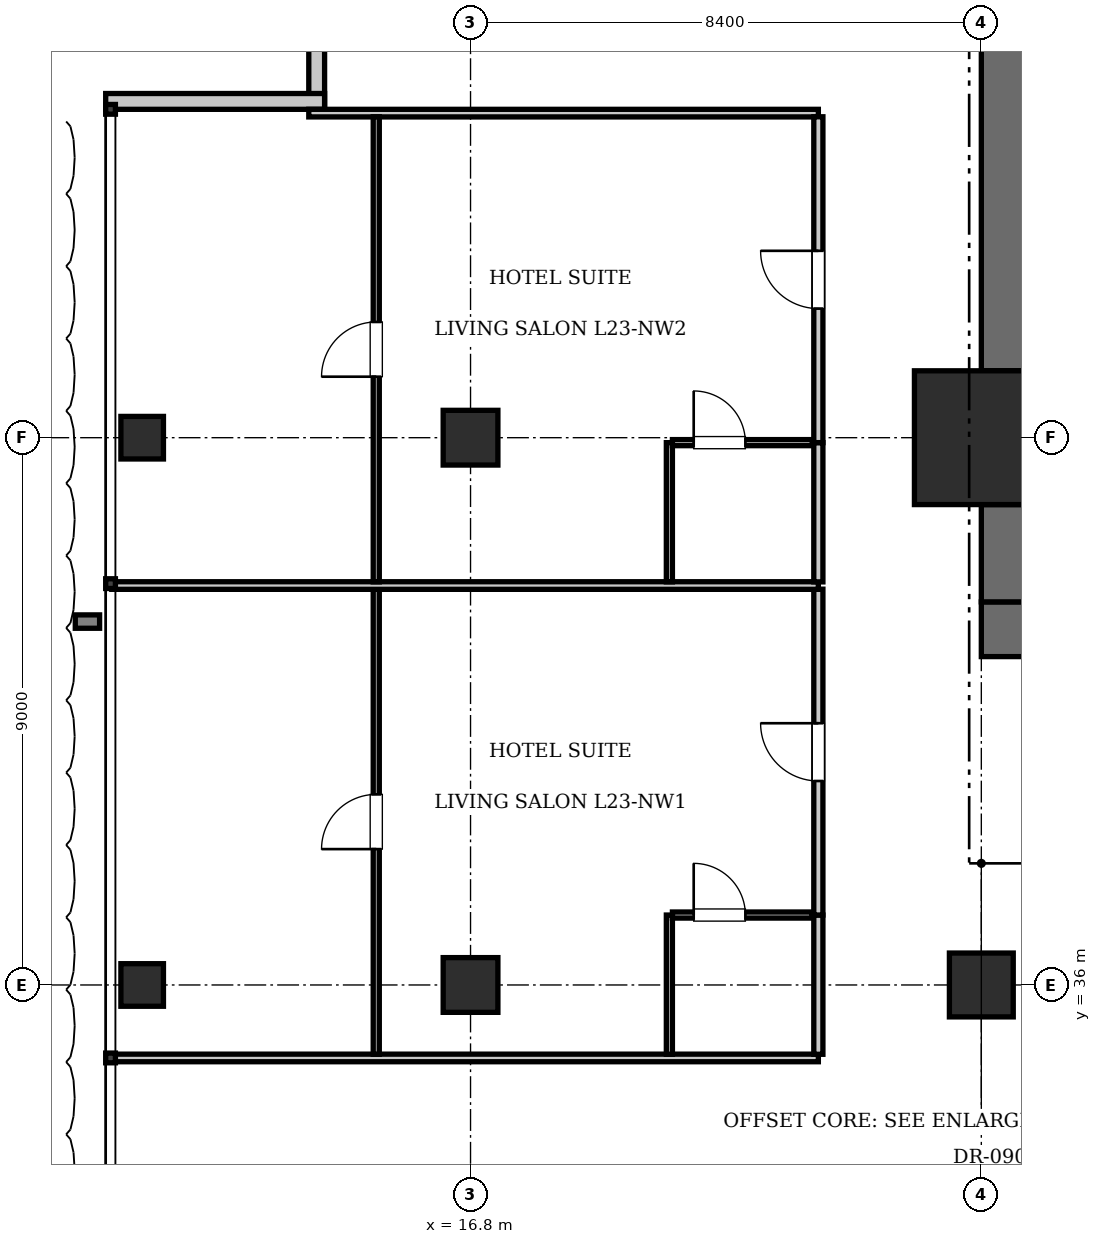
"""IFC4 building model, lengths in metres.
Left out: names, types, materials, properties, quantities, classifications, styles, units other than length and angle.
Written with IfcOpenShell. Run it as: python <this file> out.ifc"""

import sys

from ifc_helpers import new_model, si_unit, direction, frame, frame_2d, origin, origin_2d, place, context, subcontext, project, spatial, rectangle, i_section, extrude, element, fill, save


model = new_model("IFC4")
c1 = context("Model", 3, precision=1e-05, world=origin(), true_north=direction((0.0, 1.0)))
c2 = subcontext(c1, "Body", "Model", "MODEL_VIEW")
j1 = project(units=[si_unit("LENGTHUNIT", "METRE"), si_unit("PLANEANGLEUNIT", "RADIAN")], contexts=[c1])
p1 = place(None, origin())
s1 = spatial("IfcSite", under=j1, at=p1, CompositionType="ELEMENT")
p2 = place(p1, origin())
s2 = spatial("IfcBuilding", under=s1, at=p2, CompositionType="ELEMENT")
p3 = place(p2, frame((0.0, 0.0, 96.25)))
s3 = spatial("IfcBuildingStorey", under=s2, at=p3, CompositionType="ELEMENT", Elevation=96.25)
p4 = place(p3, frame((25.2, 45.0, 0.0), z_axis=(0.0, 0.0, 1.0), x_axis=(1.0, 0.0, 0.0)))
e1 = element("IfcColumn", 1, at=p4, inside=s3, PredefinedType="COLUMN", context=c2, shape_type="SweptSolid", body=[
    extrude(rectangle(XDim=2.2, YDim=2.2, at=origin_2d()), origin(), (0.0, 0.0, 1.0), 3.85),
])
p5 = place(p3, frame((25.2, 41.85, 0.0), z_axis=(0.0, 0.0, 1.0), x_axis=(1.0, 0.0, 0.0)))
e2 = element("IfcWall", 2, at=p5, inside=s3, PredefinedType="SHEAR", context=c2, shape_type="SweptSolid", body=[
    extrude(rectangle(XDim=6.8, YDim=0.9, at=frame_2d((3.4, 0.0))), origin(), (0.0, 0.0, 1.0), 3.85),
])
p6 = place(p5, frame((1.65, 0.0, 0.0)))
e3 = element("IfcOpeningElement", 3, at=p6, cuts=e2, PredefinedType="OPENING", context=c2, shape_type="SweptSolid", body=[
    extrude(rectangle(XDim=1.15, YDim=2.15, at=frame_2d((0.575, 1.075))), frame((0.0, 0.46, 0.0), z_axis=(0.0, -1.0, 0.0), x_axis=(1.0, 0.0, 0.0)), (0.0, 0.0, 1.0), 0.92),
])
p7 = place(p5, frame((5.15, 0.0, 0.0)))
e4 = element("IfcOpeningElement", 4, at=p7, cuts=e2, PredefinedType="OPENING", context=c2, shape_type="SweptSolid", body=[
    extrude(rectangle(XDim=1.1, YDim=2.2, at=frame_2d((0.55, 1.1))), frame((0.0, 0.46, 0.0), z_axis=(0.0, -1.0, 0.0), x_axis=(1.0, 0.0, 0.0)), (0.0, 0.0, 1.0), 0.92),
])
p8 = place(p3, frame((25.65, 42.3, 0.0), z_axis=(0.0, 0.0, 1.0), x_axis=(0.0, 1.0, 0.0)))
e5 = element("IfcWall", 5, at=p8, inside=s3, PredefinedType="SHEAR", context=c2, shape_type="SweptSolid", body=[
    extrude(rectangle(XDim=1.6, YDim=0.9, at=frame_2d((0.8, 0.0))), origin(), (0.0, 0.0, 1.0), 3.85),
])
p9 = place(p3, frame((25.65, 46.1, 0.0), z_axis=(0.0, 0.0, 1.0), x_axis=(0.0, 1.0, 0.0)))
e6 = element("IfcWall", 6, at=p9, inside=s3, PredefinedType="SHEAR", context=c2, shape_type="SweptSolid", body=[
    extrude(rectangle(XDim=7.0, YDim=0.9, at=frame_2d((3.5, 0.0))), origin(), (0.0, 0.0, 1.0), 3.85),
])
p10 = place(p3, frame((25.2, 36.0, 0.0), z_axis=(0.0, 0.0, 1.0), x_axis=(1.0, 0.0, 0.0)))
e7 = element("IfcColumn", 7, at=p10, inside=s3, PredefinedType="COLUMN", context=c2, shape_type="SweptSolid", body=[
    extrude(rectangle(XDim=1.05, YDim=1.05, at=origin_2d()), origin(), (0.0, 0.0, 1.0), 3.85),
])
for number, where, z_axis, x_axis in (
    (8, (16.8, 36.0, 0.0), (0.0, 0.0, 1.0), (1.0, 0.0, 0.0)),
    (9, (16.8, 45.0, 0.0), (0.0, 0.0, 1.0), (1.0, 0.0, 0.0)),
):
    element("IfcColumn", number, at=place(p3, frame(where, z_axis=z_axis, x_axis=x_axis)), inside=s3, PredefinedType="COLUMN", context=c2, shape_type="SweptSolid", body=[
        extrude(rectangle(XDim=0.9, YDim=0.9, at=origin_2d()), origin(), (0.0, 0.0, 1.0), 3.85),
    ])
for number, where, z_axis, x_axis in (
    (10, (11.4, 36.0, 0.0), (0.0, 0.0, 1.0), (1.0, 0.0, 0.0)),
    (11, (11.4, 45.0, 0.0), (0.0, 0.0, 1.0), (1.0, 0.0, 0.0)),
):
    element("IfcColumn", number, at=place(p3, frame(where, z_axis=z_axis, x_axis=x_axis)), inside=s3, PredefinedType="COLUMN", context=c2, shape_type="SweptSolid", body=[
        extrude(i_section(OverallWidth=0.7, OverallDepth=0.7, WebThickness=0.028, FlangeThickness=0.044, at=origin_2d()), origin(), (0.0, 0.0, 1.0), 3.85),
    ])
p11 = place(p3, frame((14.27, 50.4, 0.0), z_axis=(0.0, 0.0, 1.0), x_axis=(0.0, 1.0, 0.0)))
e12 = element("IfcWall", 12, at=p11, inside=s3, PredefinedType="SOLIDWALL", context=c2, shape_type="SweptSolid", body=[
    extrude(rectangle(XDim=3.6, YDim=0.26, at=frame_2d((1.8, 0.0))), origin(), (0.0, 0.0, 1.0), 3.61),
])
p12 = place(p3, frame((10.8, 50.53, 0.0), z_axis=(0.0, 0.0, 1.0), x_axis=(1.0, 0.0, 0.0)))
e13 = element("IfcWall", 13, at=p12, inside=s3, PredefinedType="SOLIDWALL", context=c2, shape_type="SweptSolid", body=[
    extrude(rectangle(XDim=3.6, YDim=0.26, at=frame_2d((1.8, 0.0))), origin(), (0.0, 0.0, 1.0), 3.61),
])
p13 = place(p3, frame((10.9, 34.8, 0.0), z_axis=(0.0, 0.0, 1.0), x_axis=(1.0, 0.0, 0.0)))
e14 = element("IfcWall", 14, at=p13, inside=s3, PredefinedType="PARTITIONING", context=c2, shape_type="SweptSolid", body=[
    extrude(rectangle(XDim=11.62, YDim=0.125, at=frame_2d((5.81, 0.0))), origin(), (0.0, 0.0, 1.0), 3.61),
])
p14 = place(p3, frame((14.14, 50.337, 0.0), z_axis=(0.0, 0.0, 1.0), x_axis=(1.0, 0.0, 0.0)))
e15 = element("IfcWall", 15, at=p14, inside=s3, PredefinedType="PARTITIONING", context=c2, shape_type="SweptSolid", body=[
    extrude(rectangle(XDim=8.38, YDim=0.125, at=frame_2d((4.19, 0.0))), origin(), (0.0, 0.0, 1.0), 3.61),
])
p15 = place(p3, frame((22.52, 34.86, 0.0), z_axis=(0.0, 0.0, 1.0), x_axis=(0.0, 1.0, 0.0)))
e16 = element("IfcWall", 16, at=p15, inside=s3, PredefinedType="PARTITIONING", context=c2, shape_type="SweptSolid", body=[
    extrude(rectangle(XDim=2.29, YDim=0.15, at=frame_2d((1.145, 0.0))), origin(), (0.0, 0.0, 1.0), 3.61),
])
p16 = place(p3, frame((22.52, 37.15, 0.0), z_axis=(0.0, 0.0, 1.0), x_axis=(0.0, 1.0, 0.0)))
e17 = element("IfcWall", 17, at=p16, inside=s3, PredefinedType="PARTITIONING", context=c2, shape_type="SweptSolid", body=[
    extrude(rectangle(XDim=5.359, YDim=0.15, at=frame_2d((2.679, 0.0))), origin(), (0.0, 0.0, 1.0), 3.61),
])
p17 = place(p16, frame((2.204, 0.0, 0.0)))
e18 = element("IfcOpeningElement", 18, at=p17, cuts=e17, PredefinedType="OPENING", context=c2, shape_type="SweptSolid", body=[
    extrude(rectangle(XDim=0.95, YDim=2.15, at=frame_2d((0.475, 1.075))), frame((0.0, 0.085, 0.0), z_axis=(0.0, -1.0, 0.0), x_axis=(1.0, 0.0, 0.0)), (0.0, 0.0, 1.0), 0.17),
])
p18 = place(p3, frame((20.07, 34.86, 0.0), z_axis=(0.0, 0.0, 1.0), x_axis=(0.0, 1.0, 0.0)))
e19 = element("IfcWall", 19, at=p18, inside=s3, PredefinedType="PARTITIONING", context=c2, shape_type="SweptSolid", body=[
    extrude(rectangle(XDim=2.29, YDim=0.1, at=frame_2d((1.145, 0.0))), origin(), (0.0, 0.0, 1.0), 3.61),
])
p19 = place(p3, frame((20.12, 37.15, 0.0), z_axis=(0.0, 0.0, 1.0), x_axis=(1.0, 0.0, 0.0)))
e20 = element("IfcWall", 20, at=p19, inside=s3, PredefinedType="PARTITIONING", context=c2, shape_type="SweptSolid", body=[
    extrude(rectangle(XDim=2.3, YDim=0.1, at=frame_2d((1.15, 0.0))), origin(), (0.0, 0.0, 1.0), 3.61),
])
p20 = place(p19, frame((0.35, 0.0, 0.0)))
e21 = element("IfcOpeningElement", 21, at=p20, cuts=e20, PredefinedType="OPENING", context=c2, shape_type="SweptSolid", body=[
    extrude(rectangle(XDim=0.85, YDim=2.1, at=frame_2d((0.425, 1.05))), frame((0.0, 0.06, 0.0), z_axis=(0.0, -1.0, 0.0), x_axis=(1.0, 0.0, 0.0)), (0.0, 0.0, 1.0), 0.12),
])
p21 = place(p3, frame((15.25, 34.86, 0.0), z_axis=(0.0, 0.0, 1.0), x_axis=(0.0, 1.0, 0.0)))
e22 = element("IfcWall", 22, at=p21, inside=s3, PredefinedType="PARTITIONING", context=c2, shape_type="SweptSolid", body=[
    extrude(rectangle(XDim=7.649, YDim=0.1, at=frame_2d((3.824, 0.0))), origin(), (0.0, 0.0, 1.0), 3.61),
])
p22 = place(p21, frame((3.374, 0.0, 0.0)))
e23 = element("IfcOpeningElement", 23, at=p22, cuts=e22, PredefinedType="OPENING", context=c2, shape_type="SweptSolid", body=[
    extrude(rectangle(XDim=0.9, YDim=2.1, at=frame_2d((0.45, 1.05))), frame((0.0, 0.06, 0.0), z_axis=(0.0, -1.0, 0.0), x_axis=(1.0, 0.0, 0.0)), (0.0, 0.0, 1.0), 0.12),
])
p23 = place(p3, frame((10.9, 42.569, 0.0), z_axis=(0.0, 0.0, 1.0), x_axis=(1.0, 0.0, 0.0)))
e24 = element("IfcWall", 24, at=p23, inside=s3, PredefinedType="PARTITIONING", context=c2, shape_type="SweptSolid", body=[
    extrude(rectangle(XDim=11.62, YDim=0.125, at=frame_2d((5.81, 0.0))), origin(), (0.0, 0.0, 1.0), 3.61),
])
p24 = place(p3, frame((22.52, 42.629, 0.0), z_axis=(0.0, 0.0, 1.0), x_axis=(0.0, 1.0, 0.0)))
e25 = element("IfcWall", 25, at=p24, inside=s3, PredefinedType="PARTITIONING", context=c2, shape_type="SweptSolid", body=[
    extrude(rectangle(XDim=2.29, YDim=0.15, at=frame_2d((1.145, 0.0))), origin(), (0.0, 0.0, 1.0), 3.61),
])
p25 = place(p3, frame((22.52, 44.919, 0.0), z_axis=(0.0, 0.0, 1.0), x_axis=(0.0, 1.0, 0.0)))
e26 = element("IfcWall", 26, at=p25, inside=s3, PredefinedType="PARTITIONING", context=c2, shape_type="SweptSolid", body=[
    extrude(rectangle(XDim=5.359, YDim=0.15, at=frame_2d((2.679, 0.0))), origin(), (0.0, 0.0, 1.0), 3.61),
])
p26 = place(p25, frame((2.204, 0.0, 0.0)))
e27 = element("IfcOpeningElement", 27, at=p26, cuts=e26, PredefinedType="OPENING", context=c2, shape_type="SweptSolid", body=[
    extrude(rectangle(XDim=0.95, YDim=2.15, at=frame_2d((0.475, 1.075))), frame((0.0, 0.085, 0.0), z_axis=(0.0, -1.0, 0.0), x_axis=(1.0, 0.0, 0.0)), (0.0, 0.0, 1.0), 0.17),
])
p27 = place(p3, frame((20.07, 42.629, 0.0), z_axis=(0.0, 0.0, 1.0), x_axis=(0.0, 1.0, 0.0)))
e28 = element("IfcWall", 28, at=p27, inside=s3, PredefinedType="PARTITIONING", context=c2, shape_type="SweptSolid", body=[
    extrude(rectangle(XDim=2.29, YDim=0.1, at=frame_2d((1.145, 0.0))), origin(), (0.0, 0.0, 1.0), 3.61),
])
p28 = place(p3, frame((20.12, 44.919, 0.0), z_axis=(0.0, 0.0, 1.0), x_axis=(1.0, 0.0, 0.0)))
e29 = element("IfcWall", 29, at=p28, inside=s3, PredefinedType="PARTITIONING", context=c2, shape_type="SweptSolid", body=[
    extrude(rectangle(XDim=2.3, YDim=0.1, at=frame_2d((1.15, 0.0))), origin(), (0.0, 0.0, 1.0), 2.999),
])
p29 = place(p28, frame((0.35, 0.0, 0.0)))
e30 = element("IfcOpeningElement", 30, at=p29, cuts=e29, PredefinedType="OPENING", context=c2, shape_type="SweptSolid", body=[
    extrude(rectangle(XDim=0.85, YDim=2.1, at=frame_2d((0.425, 1.05))), frame((0.0, 0.06, 0.0), z_axis=(0.0, -1.0, 0.0), x_axis=(1.0, 0.0, 0.0)), (0.0, 0.0, 1.0), 0.12),
])
p30 = place(p3, frame((15.25, 42.629, 0.0), z_axis=(0.0, 0.0, 1.0), x_axis=(0.0, 1.0, 0.0)))
e31 = element("IfcWall", 31, at=p30, inside=s3, PredefinedType="PARTITIONING", context=c2, shape_type="SweptSolid", body=[
    extrude(rectangle(XDim=7.649, YDim=0.1, at=frame_2d((3.824, 0.0))), origin(), (0.0, 0.0, 1.0), 3.61),
])
p31 = place(p30, frame((3.375, 0.0, 0.0)))
e32 = element("IfcOpeningElement", 32, at=p31, cuts=e31, PredefinedType="OPENING", context=c2, shape_type="SweptSolid", body=[
    extrude(rectangle(XDim=0.9, YDim=2.1, at=frame_2d((0.45, 1.05))), frame((0.0, 0.06, 0.0), z_axis=(0.0, -1.0, 0.0), x_axis=(1.0, 0.0, 0.0)), (0.0, 0.0, 1.0), 0.12),
])
p32 = place(p20, origin())
e33 = element("IfcDoor", 33, at=p32, inside=s3, OperationType="SINGLE_SWING_LEFT", PredefinedType="DOOR", context=c2, shape_type="SweptSolid", body=[
    extrude(rectangle(XDim=0.85, YDim=2.1, at=frame_2d((0.425, 1.05))), frame((0.0, 0.025, 0.0), z_axis=(0.0, -1.0, 0.0), x_axis=(1.0, 0.0, 0.0)), (0.0, 0.0, 1.0), 0.05),
])
fill(e21, e33)
p33 = place(p17, origin())
e34 = element("IfcDoor", 34, at=p33, inside=s3, OperationType="SINGLE_SWING_RIGHT", PredefinedType="DOOR", context=c2, shape_type="SweptSolid", body=[
    extrude(rectangle(XDim=0.95, YDim=2.15, at=frame_2d((0.475, 1.075))), frame((0.0, 0.025, 0.0), z_axis=(0.0, -1.0, 0.0), x_axis=(1.0, 0.0, 0.0)), (0.0, 0.0, 1.0), 0.05),
])
fill(e18, e34)
p34 = place(p22, origin())
e35 = element("IfcDoor", 35, at=p34, inside=s3, OperationType="SINGLE_SWING_LEFT", PredefinedType="DOOR", context=c2, shape_type="SweptSolid", body=[
    extrude(rectangle(XDim=0.9, YDim=2.1, at=frame_2d((0.45, 1.05))), frame((0.0, 0.025, 0.0), z_axis=(0.0, -1.0, 0.0), x_axis=(1.0, 0.0, 0.0)), (0.0, 0.0, 1.0), 0.05),
])
fill(e23, e35)
p35 = place(p29, origin())
e36 = element("IfcDoor", 36, at=p35, inside=s3, OperationType="SINGLE_SWING_LEFT", PredefinedType="DOOR", context=c2, shape_type="SweptSolid", body=[
    extrude(rectangle(XDim=0.85, YDim=2.1, at=frame_2d((0.425, 1.05))), frame((0.0, 0.025, 0.0), z_axis=(0.0, -1.0, 0.0), x_axis=(1.0, 0.0, 0.0)), (0.0, 0.0, 1.0), 0.05),
])
fill(e30, e36)
p36 = place(p26, origin())
e37 = element("IfcDoor", 37, at=p36, inside=s3, OperationType="SINGLE_SWING_RIGHT", PredefinedType="DOOR", context=c2, shape_type="SweptSolid", body=[
    extrude(rectangle(XDim=0.95, YDim=2.15, at=frame_2d((0.475, 1.075))), frame((0.0, 0.025, 0.0), z_axis=(0.0, -1.0, 0.0), x_axis=(1.0, 0.0, 0.0)), (0.0, 0.0, 1.0), 0.05),
])
fill(e27, e37)
p37 = place(p31, origin())
e38 = element("IfcDoor", 38, at=p37, inside=s3, OperationType="SINGLE_SWING_LEFT", PredefinedType="DOOR", context=c2, shape_type="SweptSolid", body=[
    extrude(rectangle(XDim=0.9, YDim=2.1, at=frame_2d((0.45, 1.05))), frame((0.0, 0.025, 0.0), z_axis=(0.0, -1.0, 0.0), x_axis=(1.0, 0.0, 0.0)), (0.0, 0.0, 1.0), 0.05),
])
fill(e32, e38)
save(model, sys.argv[1])
